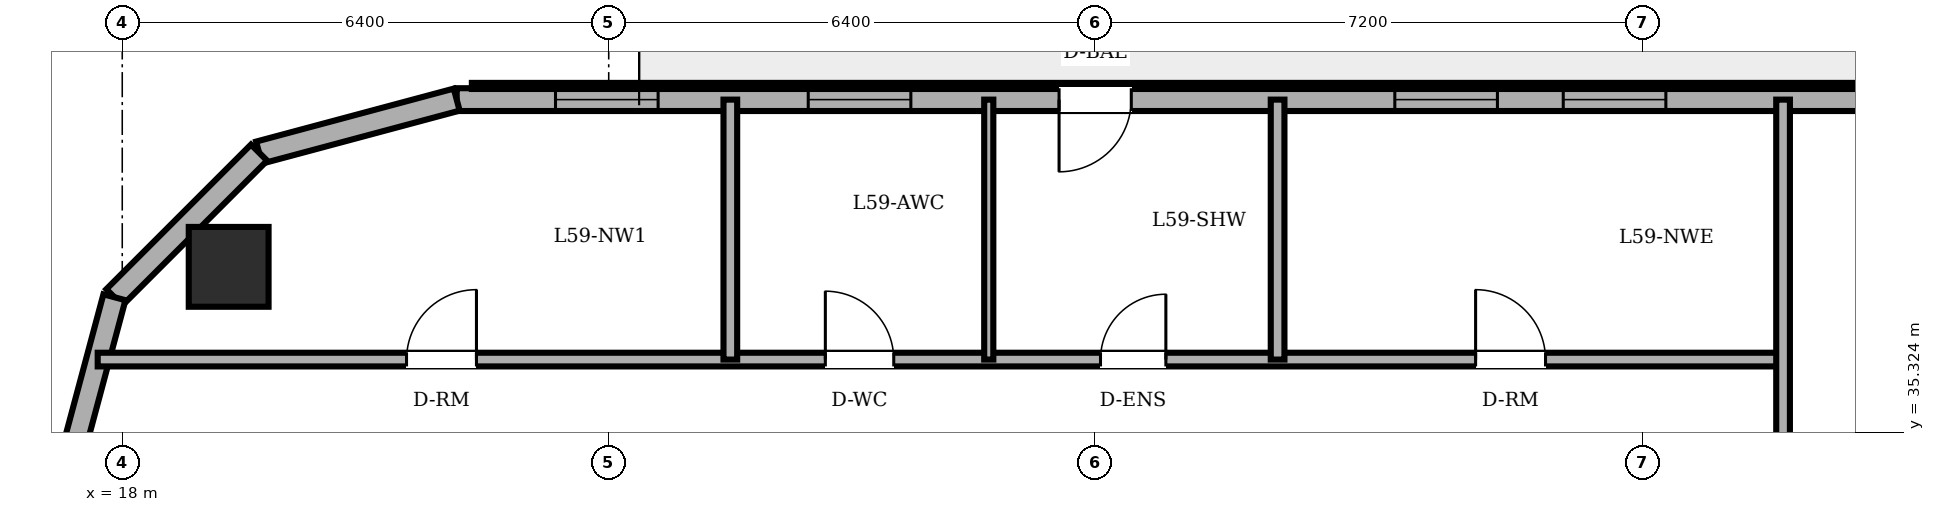
"""IFC4 building model, lengths in metres.
Left out: names, types, materials, properties, quantities, classifications, styles, units other than length and angle.
Written with IfcOpenShell. Run it as: python <this file> out.ifc"""

import sys

from ifc_helpers import new_model, si_unit, direction, frame, frame_2d, origin, origin_2d, place, context, subcontext, project, spatial, rectangle, circle, extrude, element, fill, save


model = new_model("IFC4")
c1 = context("Model", 3, precision=1e-05, world=origin(), true_north=direction((0.0, 1.0)))
c2 = subcontext(c1, "Body", "Model", "MODEL_VIEW")
j1 = project(units=[si_unit("LENGTHUNIT", "METRE"), si_unit("PLANEANGLEUNIT", "RADIAN")], contexts=[c1])
p1 = place(None, origin())
s1 = spatial("IfcSite", under=j1, at=p1, CompositionType="ELEMENT")
p2 = place(p1, origin())
s2 = spatial("IfcBuilding", under=s1, at=p2, CompositionType="ELEMENT")
p3 = place(p2, frame((0.0, 0.0, 226.5)))
s3 = spatial("IfcBuildingStorey", under=s2, at=p3, CompositionType="ELEMENT", Elevation=226.5)
p4 = place(p3, frame((19.4, 37.5, 0.0), z_axis=(0.0, 0.0, 1.0), x_axis=(1.0, 0.0, 0.0)))
e1 = element("IfcColumn", 1, at=p4, inside=s3, PredefinedType="COLUMN", context=c2, shape_type="SweptSolid", body=[
    extrude(circle(Radius=0.525, at=origin_2d()), origin(), (0.0, 0.0, 1.0), 3.6),
])
p5 = place(p3, frame((54.885, 39.7, 0.0), z_axis=(0.0, 0.0, 1.0), x_axis=(-1.0, 0.0, 0.0)))
e2 = element("IfcWall", 2, at=p5, inside=s3, PredefinedType="SOLIDWALL", context=c2, shape_type="SweptSolid", body=[
    extrude(rectangle(XDim=32.485, YDim=0.3, at=frame_2d((16.243, 0.0))), origin(), (0.0, 0.0, 1.0), 3.4),
])
p6 = place(p5, frame((23.61, 0.0, 0.0)))
e3 = element("IfcOpeningElement", 3, at=p6, cuts=e2, PredefinedType="OPENING", context=c2, shape_type="SweptSolid", body=[
    extrude(rectangle(XDim=0.95, YDim=2.2, at=frame_2d((0.475, 1.1))), frame((0.0, 0.16, 0.0), z_axis=(0.0, -1.0, 0.0), x_axis=(1.0, 0.0, 0.0)), (0.0, 0.0, 1.0), 0.32),
])
p7 = place(p5, frame((4.57, 0.0, 0.85)))
e4 = element("IfcOpeningElement", 4, at=p7, cuts=e2, PredefinedType="OPENING", context=c2, shape_type="SweptSolid", body=[
    extrude(rectangle(XDim=1.35, YDim=1.55, at=frame_2d((0.675, 0.775))), frame((0.0, 0.16, 0.0), z_axis=(0.0, -1.0, 0.0), x_axis=(1.0, 0.0, 0.0)), (0.0, 0.0, 1.0), 0.32),
])
p8 = place(p5, frame((9.465, 0.0, 0.85)))
e5 = element("IfcOpeningElement", 5, at=p8, cuts=e2, PredefinedType="OPENING", context=c2, shape_type="SweptSolid", body=[
    extrude(rectangle(XDim=1.35, YDim=1.55, at=frame_2d((0.675, 0.775))), frame((0.0, 0.16, 0.0), z_axis=(0.0, -1.0, 0.0), x_axis=(1.0, 0.0, 0.0)), (0.0, 0.0, 1.0), 0.32),
])
p9 = place(p5, frame((16.577, 0.0, 0.85)))
e6 = element("IfcOpeningElement", 6, at=p9, cuts=e2, PredefinedType="OPENING", context=c2, shape_type="SweptSolid", body=[
    extrude(rectangle(XDim=1.35, YDim=1.55, at=frame_2d((0.675, 0.775))), frame((0.0, 0.16, 0.0), z_axis=(0.0, -1.0, 0.0), x_axis=(1.0, 0.0, 0.0)), (0.0, 0.0, 1.0), 0.32),
])
p10 = place(p5, frame((18.793, 0.0, 0.85)))
e7 = element("IfcOpeningElement", 7, at=p10, cuts=e2, PredefinedType="OPENING", context=c2, shape_type="SweptSolid", body=[
    extrude(rectangle(XDim=1.35, YDim=1.55, at=frame_2d((0.675, 0.775))), frame((0.0, 0.16, 0.0), z_axis=(0.0, -1.0, 0.0), x_axis=(1.0, 0.0, 0.0)), (0.0, 0.0, 1.0), 0.32),
])
p11 = place(p5, frame((26.51, 0.0, 0.85)))
e8 = element("IfcOpeningElement", 8, at=p11, cuts=e2, PredefinedType="OPENING", context=c2, shape_type="SweptSolid", body=[
    extrude(rectangle(XDim=1.35, YDim=1.55, at=frame_2d((0.675, 0.775))), frame((0.0, 0.16, 0.0), z_axis=(0.0, -1.0, 0.0), x_axis=(1.0, 0.0, 0.0)), (0.0, 0.0, 1.0), 0.32),
])
p12 = place(p5, frame((29.835, 0.0, 0.85)))
e9 = element("IfcOpeningElement", 9, at=p12, cuts=e2, PredefinedType="OPENING", context=c2, shape_type="SweptSolid", body=[
    extrude(rectangle(XDim=1.35, YDim=1.55, at=frame_2d((0.675, 0.775))), frame((0.0, 0.16, 0.0), z_axis=(0.0, -1.0, 0.0), x_axis=(1.0, 0.0, 0.0)), (0.0, 0.0, 1.0), 0.32),
])
p13 = place(p3, frame((22.4, 39.7, 0.0), z_axis=(0.0, 0.0, 1.0), x_axis=(-0.965889330541, -0.258955210695, 0.0)))
e10 = element("IfcWall", 10, at=p13, inside=s3, PredefinedType="SOLIDWALL", context=c2, shape_type="SweptSolid", body=[
    extrude(rectangle(XDim=2.692, YDim=0.3, at=frame_2d((1.346, 0.0))), origin(), (0.0, 0.0, 1.0), 3.4),
])
p14 = place(p3, frame((19.8, 39.003, 0.0), z_axis=(0.0, 0.0, 1.0), x_axis=(-0.707152139074, -0.70706142039, 0.0)))
e11 = element("IfcWall", 11, at=p14, inside=s3, PredefinedType="SOLIDWALL", context=c2, shape_type="SweptSolid", body=[
    extrude(rectangle(XDim=2.691, YDim=0.3, at=frame_2d((1.346, 0.0))), origin(), (0.0, 0.0, 1.0), 3.4),
])
p15 = place(p3, frame((17.897, 37.1, 0.0), z_axis=(0.0, 0.0, 1.0), x_axis=(-0.258932525951, -0.965895412042, 0.0)))
e12 = element("IfcWall", 12, at=p15, inside=s3, PredefinedType="SOLIDWALL", context=c2, shape_type="SweptSolid", body=[
    extrude(rectangle(XDim=2.692, YDim=0.3, at=frame_2d((1.346, 0.0))), origin(), (0.0, 0.0, 1.0), 3.4),
])
p16 = place(p3, frame((17.677, 36.28, 0.0), z_axis=(0.0, 0.0, 1.0), x_axis=(1.0, 0.0, 0.0)))
e13 = element("IfcWall", 13, at=p16, inside=s3, PredefinedType="PARTITIONING", context=c2, shape_type="SweptSolid", body=[
    extrude(rectangle(XDim=22.173, YDim=0.18, at=frame_2d((11.086, 0.0))), origin(), (0.0, 0.0, 1.0), 3.4),
])
p17 = place(p16, frame((9.573, 0.0, 0.0)))
e14 = element("IfcOpeningElement", 14, at=p17, cuts=e13, PredefinedType="OPENING", context=c2, shape_type="SweptSolid", body=[
    extrude(rectangle(XDim=0.9, YDim=2.1, at=frame_2d((0.45, 1.05))), frame((0.0, 0.1, 0.0), z_axis=(0.0, -1.0, 0.0), x_axis=(1.0, 0.0, 0.0)), (0.0, 0.0, 1.0), 0.2),
])
p18 = place(p16, frame((13.193, 0.0, 0.0)))
e15 = element("IfcOpeningElement", 15, at=p18, cuts=e13, PredefinedType="OPENING", context=c2, shape_type="SweptSolid", body=[
    extrude(rectangle(XDim=0.86, YDim=2.1, at=frame_2d((0.43, 1.05))), frame((0.0, 0.1, 0.0), z_axis=(0.0, -1.0, 0.0), x_axis=(1.0, 0.0, 0.0)), (0.0, 0.0, 1.0), 0.2),
])
p19 = place(p16, frame((4.063, 0.0, 0.0)))
e16 = element("IfcOpeningElement", 16, at=p19, cuts=e13, PredefinedType="OPENING", context=c2, shape_type="SweptSolid", body=[
    extrude(rectangle(XDim=0.92, YDim=2.1, at=frame_2d((0.46, 1.05))), frame((0.0, 0.1, 0.0), z_axis=(0.0, -1.0, 0.0), x_axis=(1.0, 0.0, 0.0)), (0.0, 0.0, 1.0), 0.2),
])
p20 = place(p16, frame((18.128, 0.0, 0.0)))
e17 = element("IfcOpeningElement", 17, at=p20, cuts=e13, PredefinedType="OPENING", context=c2, shape_type="SweptSolid", body=[
    extrude(rectangle(XDim=0.92, YDim=2.1, at=frame_2d((0.46, 1.05))), frame((0.0, 0.1, 0.0), z_axis=(0.0, -1.0, 0.0), x_axis=(1.0, 0.0, 0.0)), (0.0, 0.0, 1.0), 0.2),
])
p21 = place(p3, frame((26.0, 36.28, 0.0), z_axis=(0.0, 0.0, 1.0), x_axis=(0.0, 1.0, 0.0)))
e18 = element("IfcWall", 18, at=p21, inside=s3, PredefinedType="PARTITIONING", context=c2, shape_type="SweptSolid", body=[
    extrude(rectangle(XDim=3.42, YDim=0.18, at=frame_2d((1.71, 0.0))), origin(), (0.0, 0.0, 1.0), 3.4),
])
p22 = place(p3, frame((29.4, 36.28, 0.0), z_axis=(0.0, 0.0, 1.0), x_axis=(0.0, 1.0, 0.0)))
e19 = element("IfcWall", 19, at=p22, inside=s3, PredefinedType="PARTITIONING", context=c2, shape_type="SweptSolid", body=[
    extrude(rectangle(XDim=3.42, YDim=0.12, at=frame_2d((1.71, 0.0))), origin(), (0.0, 0.0, 1.0), 3.4),
])
p23 = place(p3, frame((33.2, 36.28, 0.0), z_axis=(0.0, 0.0, 1.0), x_axis=(0.0, 1.0, 0.0)))
e20 = element("IfcWall", 20, at=p23, inside=s3, PredefinedType="PARTITIONING", context=c2, shape_type="SweptSolid", body=[
    extrude(rectangle(XDim=3.42, YDim=0.18, at=frame_2d((1.71, 0.0))), origin(), (0.0, 0.0, 1.0), 3.4),
])
p24 = place(p3, frame((39.85, 25.18, 0.0), z_axis=(0.0, 0.0, 1.0), x_axis=(0.0, 1.0, 0.0)))
e21 = element("IfcWall", 21, at=p24, inside=s3, PredefinedType="PARTITIONING", context=c2, shape_type="SweptSolid", body=[
    extrude(rectangle(XDim=14.52, YDim=0.18, at=frame_2d((7.26, 0.0))), origin(), (0.0, 0.0, 1.0), 3.4),
])
p25 = place(p6, origin())
e22 = element("IfcDoor", 22, at=p25, inside=s3, OperationType="SINGLE_SWING_RIGHT", PredefinedType="DOOR", context=c2, shape_type="SweptSolid", body=[
    extrude(rectangle(XDim=0.95, YDim=2.2, at=frame_2d((0.475, 1.1))), frame((0.0, 0.025, 0.0), z_axis=(0.0, -1.0, 0.0), x_axis=(1.0, 0.0, 0.0)), (0.0, 0.0, 1.0), 0.05),
])
fill(e3, e22)
p26 = place(p9, origin())
e23 = element("IfcWindow", 23, at=p26, inside=s3, PartitioningType="SINGLE_PANEL", PredefinedType="WINDOW", context=c2, shape_type="SweptSolid", body=[
    extrude(rectangle(XDim=1.35, YDim=1.55, at=frame_2d((0.675, 0.775))), frame((0.0, 0.03, 0.0), z_axis=(0.0, -1.0, 0.0), x_axis=(1.0, 0.0, 0.0)), (0.0, 0.0, 1.0), 0.06),
])
fill(e6, e23)
p27 = place(p10, origin())
e24 = element("IfcWindow", 24, at=p27, inside=s3, PartitioningType="SINGLE_PANEL", PredefinedType="WINDOW", context=c2, shape_type="SweptSolid", body=[
    extrude(rectangle(XDim=1.35, YDim=1.55, at=frame_2d((0.675, 0.775))), frame((0.0, 0.03, 0.0), z_axis=(0.0, -1.0, 0.0), x_axis=(1.0, 0.0, 0.0)), (0.0, 0.0, 1.0), 0.06),
])
fill(e7, e24)
p28 = place(p11, origin())
e25 = element("IfcWindow", 25, at=p28, inside=s3, PartitioningType="SINGLE_PANEL", PredefinedType="WINDOW", context=c2, shape_type="SweptSolid", body=[
    extrude(rectangle(XDim=1.35, YDim=1.55, at=frame_2d((0.675, 0.775))), frame((0.0, 0.03, 0.0), z_axis=(0.0, -1.0, 0.0), x_axis=(1.0, 0.0, 0.0)), (0.0, 0.0, 1.0), 0.06),
])
fill(e8, e25)
p29 = place(p12, origin())
e26 = element("IfcWindow", 26, at=p29, inside=s3, PartitioningType="SINGLE_PANEL", PredefinedType="WINDOW", context=c2, shape_type="SweptSolid", body=[
    extrude(rectangle(XDim=1.35, YDim=1.55, at=frame_2d((0.675, 0.775))), frame((0.0, 0.03, 0.0), z_axis=(0.0, -1.0, 0.0), x_axis=(1.0, 0.0, 0.0)), (0.0, 0.0, 1.0), 0.06),
])
fill(e9, e26)
p30 = place(p17, origin())
e27 = element("IfcDoor", 27, at=p30, inside=s3, OperationType="SINGLE_SWING_LEFT", PredefinedType="DOOR", context=c2, shape_type="SweptSolid", body=[
    extrude(rectangle(XDim=0.9, YDim=2.1, at=frame_2d((0.45, 1.05))), frame((0.0, 0.025, 0.0), z_axis=(0.0, -1.0, 0.0), x_axis=(1.0, 0.0, 0.0)), (0.0, 0.0, 1.0), 0.05),
])
fill(e14, e27)
p31 = place(p18, origin())
e28 = element("IfcDoor", 28, at=p31, inside=s3, OperationType="SINGLE_SWING_RIGHT", PredefinedType="DOOR", context=c2, shape_type="SweptSolid", body=[
    extrude(rectangle(XDim=0.86, YDim=2.1, at=frame_2d((0.43, 1.05))), frame((0.0, 0.025, 0.0), z_axis=(0.0, -1.0, 0.0), x_axis=(1.0, 0.0, 0.0)), (0.0, 0.0, 1.0), 0.05),
])
fill(e15, e28)
p32 = place(p19, origin())
e29 = element("IfcDoor", 29, at=p32, inside=s3, OperationType="SINGLE_SWING_RIGHT", PredefinedType="DOOR", context=c2, shape_type="SweptSolid", body=[
    extrude(rectangle(XDim=0.92, YDim=2.1, at=frame_2d((0.46, 1.05))), frame((0.0, 0.025, 0.0), z_axis=(0.0, -1.0, 0.0), x_axis=(1.0, 0.0, 0.0)), (0.0, 0.0, 1.0), 0.05),
])
fill(e16, e29)
p33 = place(p20, origin())
e30 = element("IfcDoor", 30, at=p33, inside=s3, OperationType="SINGLE_SWING_LEFT", PredefinedType="DOOR", context=c2, shape_type="SweptSolid", body=[
    extrude(rectangle(XDim=0.92, YDim=2.1, at=frame_2d((0.46, 1.05))), frame((0.0, 0.025, 0.0), z_axis=(0.0, -1.0, 0.0), x_axis=(1.0, 0.0, 0.0)), (0.0, 0.0, 1.0), 0.05),
])
fill(e17, e30)
save(model, sys.argv[1])
